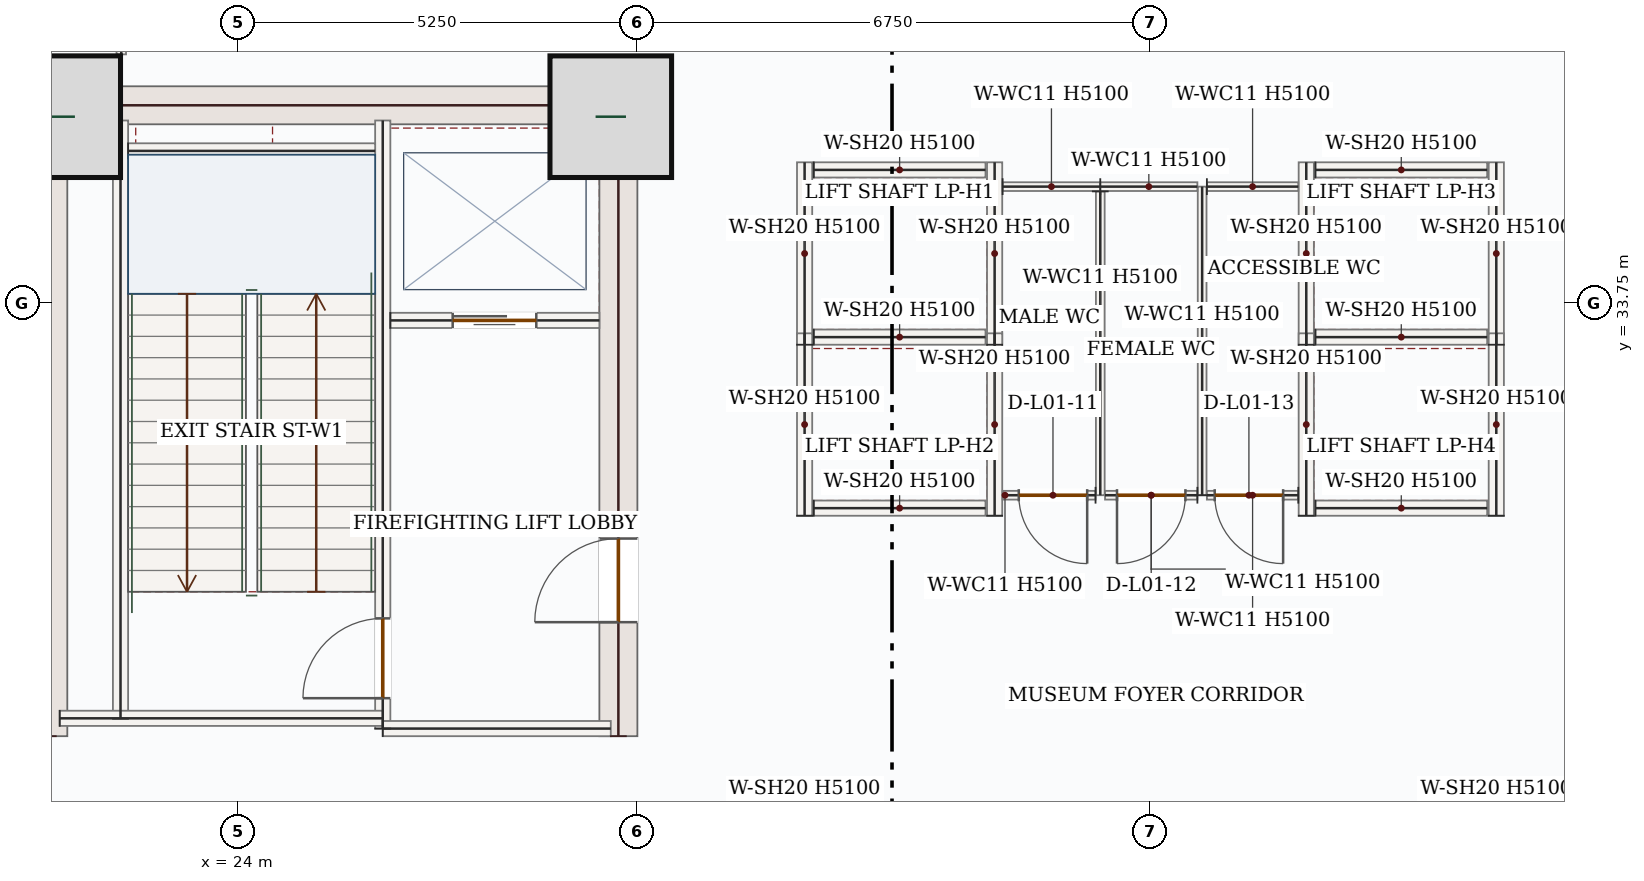
"""IFC4 building model, lengths in metres.
Left out: names, types, materials, properties, quantities, classifications, styles, units other than length and angle.
Written with IfcOpenShell. Run it as: python <this file> out.ifc"""

import sys

from ifc_helpers import new_model, si_unit, direction, frame, frame_2d, origin, origin_2d, place, context, subcontext, project, spatial, rectangle, extrude, source, transform, mapped, element, fill, save


model = new_model("IFC4")
c1 = context("Model", 3, precision=1e-05, world=origin(), true_north=direction((0.0, 1.0)))
c2 = subcontext(c1, "Body", "Model", "MODEL_VIEW")
j1 = project(units=[si_unit("LENGTHUNIT", "METRE"), si_unit("PLANEANGLEUNIT", "RADIAN")], contexts=[c1])
p1 = place(None, origin())
s1 = spatial("IfcSite", under=j1, at=p1, CompositionType="ELEMENT")
p2 = place(p1, origin())
s2 = spatial("IfcBuilding", under=s1, at=p2, CompositionType="ELEMENT")
p3 = place(p2, frame((0.0, 0.0, 7.2)))
s3 = spatial("IfcBuildingStorey", under=s2, at=p3, CompositionType="ELEMENT", Elevation=7.2)
m1 = source(origin(), c2, "Body", "SweptSolid", [
    extrude(rectangle(XDim=8.55, YDim=0.5, at=frame_2d((4.275, 0.0))), origin(), (0.0, 0.0, 1.0), 5.1),
])
p4 = place(p3, frame((21.5, 28.05, 0.0), z_axis=(0.0, 0.0, 1.0), x_axis=(0.0, 1.0, 0.0)))
e1 = element("IfcWall", 1, at=p4, inside=s3, PredefinedType="SHEAR", context=c2, shape_type="MappedRepresentation", body=[
    mapped(m1, transform((0.0, 0.0, 0.0), x_axis=(1.0, 0.0, 0.0), y_axis=(0.0, 1.0, 0.0), z_axis=(0.0, 0.0, 1.0), scale=1.0)),
])
p5 = place(p3, frame((29.0, 28.05, 0.0), z_axis=(0.0, 0.0, 1.0), x_axis=(0.0, 1.0, 0.0)))
e2 = element("IfcWall", 2, at=p5, inside=s3, PredefinedType="SHEAR", context=c2, shape_type="SweptSolid", body=[
    extrude(rectangle(XDim=8.55, YDim=0.5, at=frame_2d((4.275, 0.0))), origin(), (0.0, 0.0, 1.0), 5.1),
])
p6 = place(p5, frame((1.5, 0.0, 0.0)))
e3 = element("IfcOpeningElement", 3, at=p6, cuts=e2, PredefinedType="OPENING", context=c2, shape_type="SweptSolid", body=[
    extrude(rectangle(XDim=1.1, YDim=2.2, at=frame_2d((0.55, 1.1))), frame((0.0, 0.26, 0.0), z_axis=(0.0, -1.0, 0.0), x_axis=(1.0, 0.0, 0.0)), (0.0, 0.0, 1.0), 0.52),
])
m2 = source(origin(), c2, "Body", "SweptSolid", [
    extrude(rectangle(XDim=7.0, YDim=0.5, at=frame_2d((3.5, 0.0))), origin(), (0.0, 0.0, 1.0), 5.1),
])
p7 = place(p3, frame((21.75, 36.35, 0.0), z_axis=(0.0, 0.0, 1.0), x_axis=(1.0, 0.0, 0.0)))
e4 = element("IfcWall", 4, at=p7, inside=s3, PredefinedType="SHEAR", context=c2, shape_type="MappedRepresentation", body=[
    mapped(m2, transform((0.0, 0.0, 0.0), x_axis=(1.0, 0.0, 0.0), y_axis=(0.0, 1.0, 0.0), z_axis=(0.0, 0.0, 1.0), scale=1.0)),
])
m3 = source(origin(), c2, "Body", "SweptSolid", [
    extrude(rectangle(XDim=1.6, YDim=1.6, at=origin_2d()), origin(), (0.0, 0.0, 1.0), 5.4),
])
for number, where, z_axis, x_axis in (
    (5, (21.65, 36.2, 0.0), (0.0, 0.0, 1.0), (1.0, 0.0, 0.0)),
    (6, (28.9, 36.2, 0.0), (0.0, 0.0, 1.0), (1.0, 0.0, 0.0)),
):
    element("IfcColumn", number, at=place(p3, frame(where, z_axis=z_axis, x_axis=x_axis)), inside=s3, PredefinedType="COLUMN", context=c2, shape_type="MappedRepresentation", body=[
        mapped(m3, transform((0.0, 0.0, 0.0), x_axis=(1.0, 0.0, 0.0), y_axis=(0.0, 1.0, 0.0), z_axis=(0.0, 0.0, 1.0), scale=1.0)),
    ])
m4 = source(origin(), c2, "Body", "SweptSolid", [
    extrude(rectangle(XDim=7.87, YDim=0.2, at=frame_2d((3.935, 0.0))), origin(), (0.0, 0.0, 1.0), 5.1),
])
p8 = place(p3, frame((22.45, 28.28, 0.0), z_axis=(0.0, 0.0, 1.0), x_axis=(0.0, 1.0, 0.0)))
e7 = element("IfcWall", 7, at=p8, inside=s3, PredefinedType="SOLIDWALL", context=c2, shape_type="MappedRepresentation", body=[
    mapped(m4, transform((0.0, 0.0, 0.0), x_axis=(1.0, 0.0, 0.0), y_axis=(0.0, 1.0, 0.0), z_axis=(0.0, 0.0, 1.0), scale=1.0)),
])
p9 = place(p3, frame((25.9, 28.15, 0.0), z_axis=(0.0, 0.0, 1.0), x_axis=(0.0, 1.0, 0.0)))
e8 = element("IfcWall", 8, at=p9, inside=s3, PredefinedType="SOLIDWALL", context=c2, shape_type="SweptSolid", body=[
    extrude(rectangle(XDim=8.0, YDim=0.2, at=frame_2d((4.0, 0.0))), origin(), (0.0, 0.0, 1.0), 5.1),
])
p10 = place(p9, frame((0.4, 0.0, 0.0)))
e9 = element("IfcOpeningElement", 9, at=p10, cuts=e8, PredefinedType="OPENING", context=c2, shape_type="SweptSolid", body=[
    extrude(rectangle(XDim=1.05, YDim=2.15, at=frame_2d((0.525, 1.075))), frame((0.0, 0.11, 0.0), z_axis=(0.0, -1.0, 0.0), x_axis=(1.0, 0.0, 0.0)), (0.0, 0.0, 1.0), 0.22),
])
m5 = source(origin(), c2, "Body", "SweptSolid", [
    extrude(rectangle(XDim=4.25, YDim=0.2, at=frame_2d((2.125, 0.0))), origin(), (0.0, 0.0, 1.0), 5.1),
])
p11 = place(p3, frame((21.65, 28.285, 0.0), z_axis=(0.0, 0.0, 1.0), x_axis=(1.0, 0.0, 0.0)))
e10 = element("IfcWall", 10, at=p11, inside=s3, PredefinedType="SOLIDWALL", context=c2, shape_type="MappedRepresentation", body=[
    mapped(m5, transform((0.0, 0.0, 0.0), x_axis=(1.0, 0.0, 0.0), y_axis=(0.0, 1.0, 0.0), z_axis=(0.0, 0.0, 1.0), scale=1.0)),
])
m6 = source(origin(), c2, "Body", "SweptSolid", [
    extrude(rectangle(XDim=3.0, YDim=0.2, at=frame_2d((1.5, 0.0))), origin(), (0.0, 0.0, 1.0), 5.1),
])
p12 = place(p3, frame((25.9, 28.15, 0.0), z_axis=(0.0, 0.0, 1.0), x_axis=(1.0, 0.0, 0.0)))
e11 = element("IfcWall", 11, at=p12, inside=s3, PredefinedType="SOLIDWALL", context=c2, shape_type="MappedRepresentation", body=[
    mapped(m6, transform((0.0, 0.0, 0.0), x_axis=(1.0, 0.0, 0.0), y_axis=(0.0, 1.0, 0.0), z_axis=(0.0, 0.0, 1.0), scale=1.0)),
])
m7 = source(origin(), c2, "Body", "SweptSolid", [
    extrude(rectangle(XDim=3.25, YDim=0.2, at=frame_2d((1.625, 0.0))), origin(), (0.0, 0.0, 1.0), 5.1),
])
p13 = place(p3, frame((22.55, 35.75, 0.0), z_axis=(0.0, 0.0, 1.0), x_axis=(1.0, 0.0, 0.0)))
e12 = element("IfcWall", 12, at=p13, inside=s3, PredefinedType="SOLIDWALL", context=c2, shape_type="MappedRepresentation", body=[
    mapped(m7, transform((0.0, 0.0, 0.0), x_axis=(1.0, 0.0, 0.0), y_axis=(0.0, 1.0, 0.0), z_axis=(0.0, 0.0, 1.0), scale=1.0)),
])
p14 = place(p3, frame((26.0, 33.52, 0.0), z_axis=(0.0, 0.0, 1.0), x_axis=(1.0, 0.0, 0.0)))
e13 = element("IfcWall", 13, at=p14, inside=s3, PredefinedType="SOLIDWALL", context=c2, shape_type="SweptSolid", body=[
    extrude(rectangle(XDim=2.75, YDim=0.2, at=frame_2d((1.375, 0.0))), origin(), (0.0, 0.0, 1.0), 5.1),
])
p15 = place(p14, frame((0.82, 0.0, 0.0)))
e14 = element("IfcOpeningElement", 14, at=p15, cuts=e13, PredefinedType="OPENING", context=c2, shape_type="SweptSolid", body=[
    extrude(rectangle(XDim=1.1, YDim=2.15, at=frame_2d((0.55, 1.075))), frame((0.0, 0.11, 0.0), z_axis=(0.0, -1.0, 0.0), x_axis=(1.0, 0.0, 0.0)), (0.0, 0.0, 1.0), 0.22),
])
m8 = source(origin(), c2, "Body", "SweptSolid", [
    extrude(rectangle(XDim=2.4, YDim=0.2, at=frame_2d((1.2, 0.0))), origin(), (0.0, 0.0, 1.0), 5.1),
])
for number, where, z_axis, x_axis in (
    (15, (31.45, 33.2, 0.0), (0.0, 0.0, 1.0), (0.0, 1.0, 0.0)),
    (16, (33.95, 33.2, 0.0), (0.0, 0.0, 1.0), (0.0, 1.0, 0.0)),
):
    element("IfcWall", number, at=place(p3, frame(where, z_axis=z_axis, x_axis=x_axis)), inside=s3, PredefinedType="SOLIDWALL", context=c2, shape_type="MappedRepresentation", body=[
        mapped(m8, transform((0.0, 0.0, 0.0), x_axis=(1.0, 0.0, 0.0), y_axis=(0.0, 1.0, 0.0), z_axis=(0.0, 0.0, 1.0), scale=1.0)),
    ])
m9 = source(origin(), c2, "Body", "SweptSolid", [
    extrude(rectangle(XDim=2.26, YDim=0.2, at=frame_2d((1.13, 0.0))), origin(), (0.0, 0.0, 1.0), 5.1),
])
for number, where, z_axis, x_axis in (
    (17, (31.57, 33.3, 0.0), (0.0, 0.0, 1.0), (1.0, 0.0, 0.0)),
    (18, (31.57, 35.5, 0.0), (0.0, 0.0, 1.0), (1.0, 0.0, 0.0)),
):
    element("IfcWall", number, at=place(p3, frame(where, z_axis=z_axis, x_axis=x_axis)), inside=s3, PredefinedType="SOLIDWALL", context=c2, shape_type="MappedRepresentation", body=[
        mapped(m9, transform((0.0, 0.0, 0.0), x_axis=(1.0, 0.0, 0.0), y_axis=(0.0, 1.0, 0.0), z_axis=(0.0, 0.0, 1.0), scale=1.0)),
    ])
for number, where, z_axis, x_axis in (
    (19, (31.45, 30.95, 0.0), (0.0, 0.0, 1.0), (0.0, 1.0, 0.0)),
    (20, (33.95, 30.95, 0.0), (0.0, 0.0, 1.0), (0.0, 1.0, 0.0)),
):
    element("IfcWall", number, at=place(p3, frame(where, z_axis=z_axis, x_axis=x_axis)), inside=s3, PredefinedType="SOLIDWALL", context=c2, shape_type="MappedRepresentation", body=[
        mapped(m8, transform((0.0, 0.0, 0.0), x_axis=(1.0, 0.0, 0.0), y_axis=(0.0, 1.0, 0.0), z_axis=(0.0, 0.0, 1.0), scale=1.0)),
    ])
p16 = place(p3, frame((31.57, 31.05, 0.0), z_axis=(0.0, 0.0, 1.0), x_axis=(1.0, 0.0, 0.0)))
e21 = element("IfcWall", 21, at=p16, inside=s3, PredefinedType="SOLIDWALL", context=c2, shape_type="MappedRepresentation", body=[
    mapped(m9, transform((0.0, 0.0, 0.0), x_axis=(1.0, 0.0, 0.0), y_axis=(0.0, 1.0, 0.0), z_axis=(0.0, 0.0, 1.0), scale=1.0)),
])
for number, where, z_axis, x_axis in (
    (22, (38.05, 33.2, 0.0), (0.0, 0.0, 1.0), (0.0, 1.0, 0.0)),
    (23, (40.55, 33.2, 0.0), (0.0, 0.0, 1.0), (0.0, 1.0, 0.0)),
):
    element("IfcWall", number, at=place(p3, frame(where, z_axis=z_axis, x_axis=x_axis)), inside=s3, PredefinedType="SOLIDWALL", context=c2, shape_type="MappedRepresentation", body=[
        mapped(m8, transform((0.0, 0.0, 0.0), x_axis=(1.0, 0.0, 0.0), y_axis=(0.0, 1.0, 0.0), z_axis=(0.0, 0.0, 1.0), scale=1.0)),
    ])
for number, where, z_axis, x_axis in (
    (24, (38.17, 33.3, 0.0), (0.0, 0.0, 1.0), (1.0, 0.0, 0.0)),
    (25, (38.17, 35.5, 0.0), (0.0, 0.0, 1.0), (1.0, 0.0, 0.0)),
):
    element("IfcWall", number, at=place(p3, frame(where, z_axis=z_axis, x_axis=x_axis)), inside=s3, PredefinedType="SOLIDWALL", context=c2, shape_type="MappedRepresentation", body=[
        mapped(m9, transform((0.0, 0.0, 0.0), x_axis=(1.0, 0.0, 0.0), y_axis=(0.0, 1.0, 0.0), z_axis=(0.0, 0.0, 1.0), scale=1.0)),
    ])
for number, where, z_axis, x_axis in (
    (26, (38.05, 30.95, 0.0), (0.0, 0.0, 1.0), (0.0, 1.0, 0.0)),
    (27, (40.55, 30.95, 0.0), (0.0, 0.0, 1.0), (0.0, 1.0, 0.0)),
):
    element("IfcWall", number, at=place(p3, frame(where, z_axis=z_axis, x_axis=x_axis)), inside=s3, PredefinedType="SOLIDWALL", context=c2, shape_type="MappedRepresentation", body=[
        mapped(m8, transform((0.0, 0.0, 0.0), x_axis=(1.0, 0.0, 0.0), y_axis=(0.0, 1.0, 0.0), z_axis=(0.0, 0.0, 1.0), scale=1.0)),
    ])
p17 = place(p3, frame((38.17, 31.05, 0.0), z_axis=(0.0, 0.0, 1.0), x_axis=(1.0, 0.0, 0.0)))
e28 = element("IfcWall", 28, at=p17, inside=s3, PredefinedType="SOLIDWALL", context=c2, shape_type="MappedRepresentation", body=[
    mapped(m9, transform((0.0, 0.0, 0.0), x_axis=(1.0, 0.0, 0.0), y_axis=(0.0, 1.0, 0.0), z_axis=(0.0, 0.0, 1.0), scale=1.0)),
])
m10 = source(origin(), c2, "Body", "SweptSolid", [
    extrude(rectangle(XDim=4.06, YDim=0.115, at=frame_2d((2.03, 0.0))), origin(), (0.0, 0.0, 1.0), 5.1),
])
p18 = place(p3, frame((36.68, 31.22, 0.0), z_axis=(0.0, 0.0, 1.0), x_axis=(0.0, 1.0, 0.0)))
e29 = element("IfcWall", 29, at=p18, inside=s3, PredefinedType="PARTITIONING", context=c2, shape_type="MappedRepresentation", body=[
    mapped(m10, transform((0.0, 0.0, 0.0), x_axis=(1.0, 0.0, 0.0), y_axis=(0.0, 1.0, 0.0), z_axis=(0.0, 0.0, 1.0), scale=1.0)),
])
m11 = source(origin(), c2, "Body", "SweptSolid", [
    extrude(rectangle(XDim=1.203, YDim=0.115, at=frame_2d((0.601, 0.0))), origin(), (0.0, 0.0, 1.0), 5.1),
])
p19 = place(p3, frame((36.742, 35.28, 0.0), z_axis=(0.0, 0.0, 1.0), x_axis=(1.0, 0.0, 0.0)))
e30 = element("IfcWall", 30, at=p19, inside=s3, PredefinedType="PARTITIONING", context=c2, shape_type="MappedRepresentation", body=[
    mapped(m11, transform((0.0, 0.0, 0.0), x_axis=(1.0, 0.0, 0.0), y_axis=(0.0, 1.0, 0.0), z_axis=(0.0, 0.0, 1.0), scale=1.0)),
])
p20 = place(p3, frame((37.945, 31.22, 0.0), z_axis=(0.0, 0.0, 1.0), x_axis=(-1.0, 0.0, 0.0)))
e31 = element("IfcWall", 31, at=p20, inside=s3, PredefinedType="PARTITIONING", context=c2, shape_type="SweptSolid", body=[
    extrude(rectangle(XDim=1.203, YDim=0.115, at=frame_2d((0.601, 0.0))), origin(), (0.0, 0.0, 1.0), 5.1),
])
p21 = place(p20, frame((0.2, 0.0, 0.0)))
e32 = element("IfcOpeningElement", 32, at=p21, cuts=e31, PredefinedType="OPENING", context=c2, shape_type="SweptSolid", body=[
    extrude(rectangle(XDim=0.9, YDim=2.1, at=frame_2d((0.45, 1.05))), frame((0.0, 0.067, 0.0), z_axis=(0.0, -1.0, 0.0), x_axis=(1.0, 0.0, 0.0)), (0.0, 0.0, 1.0), 0.135),
])
m12 = source(origin(), c2, "Body", "SweptSolid", [
    extrude(rectangle(XDim=1.285, YDim=0.115, at=frame_2d((0.643, 0.0))), origin(), (0.0, 0.0, 1.0), 5.1),
])
p22 = place(p3, frame((34.055, 35.28, 0.0), z_axis=(0.0, 0.0, 1.0), x_axis=(1.0, 0.0, 0.0)))
e33 = element("IfcWall", 33, at=p22, inside=s3, PredefinedType="PARTITIONING", context=c2, shape_type="MappedRepresentation", body=[
    mapped(m12, transform((0.0, 0.0, 0.0), x_axis=(1.0, 0.0, 0.0), y_axis=(0.0, 1.0, 0.0), z_axis=(0.0, 0.0, 1.0), scale=1.0)),
])
m13 = source(origin(), c2, "Body", "SweptSolid", [
    extrude(rectangle(XDim=3.998, YDim=0.115, at=frame_2d((1.999, 0.0))), origin(), (0.0, 0.0, 1.0), 5.1),
])
p23 = place(p3, frame((35.34, 35.218, 0.0), z_axis=(0.0, 0.0, 1.0), x_axis=(0.0, -1.0, 0.0)))
e34 = element("IfcWall", 34, at=p23, inside=s3, PredefinedType="PARTITIONING", context=c2, shape_type="MappedRepresentation", body=[
    mapped(m13, transform((0.0, 0.0, 0.0), x_axis=(1.0, 0.0, 0.0), y_axis=(0.0, 1.0, 0.0), z_axis=(0.0, 0.0, 1.0), scale=1.0)),
])
p24 = place(p3, frame((35.278, 31.22, 0.0), z_axis=(0.0, 0.0, 1.0), x_axis=(-1.0, 0.0, 0.0)))
e35 = element("IfcWall", 35, at=p24, inside=s3, PredefinedType="PARTITIONING", context=c2, shape_type="SweptSolid", body=[
    extrude(rectangle(XDim=1.223, YDim=0.115, at=frame_2d((0.611, 0.0))), origin(), (0.0, 0.0, 1.0), 5.1),
])
p25 = place(p24, frame((0.11, 0.0, 0.0)))
e36 = element("IfcOpeningElement", 36, at=p25, cuts=e35, PredefinedType="OPENING", context=c2, shape_type="SweptSolid", body=[
    extrude(rectangle(XDim=0.9, YDim=2.1, at=frame_2d((0.45, 1.05))), frame((0.0, 0.067, 0.0), z_axis=(0.0, -1.0, 0.0), x_axis=(1.0, 0.0, 0.0)), (0.0, 0.0, 1.0), 0.135),
])
m14 = source(origin(), c2, "Body", "SweptSolid", [
    extrude(rectangle(XDim=1.277, YDim=0.115, at=frame_2d((0.639, 0.0))), origin(), (0.0, 0.0, 1.0), 5.1),
])
p26 = place(p3, frame((35.34, 35.28, 0.0), z_axis=(0.0, 0.0, 1.0), x_axis=(1.0, 0.0, 0.0)))
e37 = element("IfcWall", 37, at=p26, inside=s3, PredefinedType="PARTITIONING", context=c2, shape_type="MappedRepresentation", body=[
    mapped(m14, transform((0.0, 0.0, 0.0), x_axis=(1.0, 0.0, 0.0), y_axis=(0.0, 1.0, 0.0), z_axis=(0.0, 0.0, 1.0), scale=1.0)),
])
p27 = place(p3, frame((36.617, 31.22, 0.0), z_axis=(0.0, 0.0, 1.0), x_axis=(-1.0, 0.0, 0.0)))
e38 = element("IfcWall", 38, at=p27, inside=s3, PredefinedType="PARTITIONING", context=c2, shape_type="SweptSolid", body=[
    extrude(rectangle(XDim=1.215, YDim=0.115, at=frame_2d((0.607, 0.0))), origin(), (0.0, 0.0, 1.0), 5.1),
])
p28 = place(p27, frame((0.157, 0.0, 0.0)))
e39 = element("IfcOpeningElement", 39, at=p28, cuts=e38, PredefinedType="OPENING", context=c2, shape_type="SweptSolid", body=[
    extrude(rectangle(XDim=0.9, YDim=2.1, at=frame_2d((0.45, 1.05))), frame((0.0, 0.067, 0.0), z_axis=(0.0, -1.0, 0.0), x_axis=(1.0, 0.0, 0.0)), (0.0, 0.0, 1.0), 0.135),
])
m15 = source(origin(), c2, "Body", "SweptSolid", [
    extrude(rectangle(XDim=1.826, YDim=0.125, at=frame_2d((0.913, 0.0))), origin(), (0.0, 0.0, 1.0), 5.1),
])
p29 = place(p3, frame((22.46, 38.846, 0.0), z_axis=(0.0, 0.0, 1.0), x_axis=(0.0, -1.0, 0.0)))
e40 = element("IfcWall", 40, at=p29, inside=s3, PredefinedType="PARTITIONING", context=c2, shape_type="MappedRepresentation", body=[
    mapped(m15, transform((0.0, 0.0, 0.0), x_axis=(1.0, 0.0, 0.0), y_axis=(0.0, 1.0, 0.0), z_axis=(0.0, 0.0, 1.0), scale=1.0)),
])
m16 = source(origin(), c2, "Body", "SweptSolid", [
    extrude(rectangle(XDim=1.05, YDim=2.15, at=frame_2d((0.525, 1.075))), frame((0.0, 0.025, 0.0), z_axis=(0.0, -1.0, 0.0), x_axis=(1.0, 0.0, 0.0)), (0.0, 0.0, 1.0), 0.05),
])
p30 = place(p10, origin())
e41 = element("IfcDoor", 41, at=p30, inside=s3, OperationType="SINGLE_SWING_LEFT", PredefinedType="DOOR", context=c2, shape_type="MappedRepresentation", body=[
    mapped(m16, transform((0.0, 0.0, 0.0), x_axis=(1.0, 0.0, 0.0), y_axis=(0.0, 1.0, 0.0), z_axis=(0.0, 0.0, 1.0), scale=1.0)),
])
fill(e9, e41)
m17 = source(origin(), c2, "Body", "SweptSolid", [
    extrude(rectangle(XDim=1.1, YDim=2.15, at=frame_2d((0.55, 1.075))), frame((0.0, 0.025, 0.0), z_axis=(0.0, -1.0, 0.0), x_axis=(1.0, 0.0, 0.0)), (0.0, 0.0, 1.0), 0.05),
])
p31 = place(p15, origin())
e42 = element("IfcDoor", 42, at=p31, inside=s3, OperationType="DOUBLE_DOOR_SLIDING", PredefinedType="DOOR", context=c2, shape_type="MappedRepresentation", body=[
    mapped(m17, transform((0.0, 0.0, 0.0), x_axis=(1.0, 0.0, 0.0), y_axis=(0.0, 1.0, 0.0), z_axis=(0.0, 0.0, 1.0), scale=1.0)),
])
fill(e14, e42)
m18 = source(origin(), c2, "Body", "SweptSolid", [
    extrude(rectangle(XDim=1.1, YDim=2.2, at=frame_2d((0.55, 1.1))), frame((0.0, 0.025, 0.0), z_axis=(0.0, -1.0, 0.0), x_axis=(1.0, 0.0, 0.0)), (0.0, 0.0, 1.0), 0.05),
])
p32 = place(p6, origin())
e43 = element("IfcDoor", 43, at=p32, inside=s3, OperationType="SINGLE_SWING_LEFT", PredefinedType="DOOR", context=c2, shape_type="MappedRepresentation", body=[
    mapped(m18, transform((0.0, 0.0, 0.0), x_axis=(1.0, 0.0, 0.0), y_axis=(0.0, 1.0, 0.0), z_axis=(0.0, 0.0, 1.0), scale=1.0)),
])
fill(e3, e43)
m19 = source(origin(), c2, "Body", "SweptSolid", [
    extrude(rectangle(XDim=0.9, YDim=2.1, at=frame_2d((0.45, 1.05))), frame((0.0, 0.025, 0.0), z_axis=(0.0, -1.0, 0.0), x_axis=(1.0, 0.0, 0.0)), (0.0, 0.0, 1.0), 0.05),
])
p33 = place(p25, origin())
e44 = element("IfcDoor", 44, at=p33, inside=s3, OperationType="SINGLE_SWING_LEFT", PredefinedType="DOOR", context=c2, shape_type="MappedRepresentation", body=[
    mapped(m19, transform((0.0, 0.0, 0.0), x_axis=(1.0, 0.0, 0.0), y_axis=(0.0, 1.0, 0.0), z_axis=(0.0, 0.0, 1.0), scale=1.0)),
])
fill(e36, e44)
p34 = place(p28, origin())
e45 = element("IfcDoor", 45, at=p34, inside=s3, OperationType="SINGLE_SWING_RIGHT", PredefinedType="DOOR", context=c2, shape_type="MappedRepresentation", body=[
    mapped(m19, transform((0.0, 0.0, 0.0), x_axis=(1.0, 0.0, 0.0), y_axis=(0.0, 1.0, 0.0), z_axis=(0.0, 0.0, 1.0), scale=1.0)),
])
fill(e39, e45)
p35 = place(p21, origin())
e46 = element("IfcDoor", 46, at=p35, inside=s3, OperationType="SINGLE_SWING_LEFT", PredefinedType="DOOR", context=c2, shape_type="MappedRepresentation", body=[
    mapped(m19, transform((0.0, 0.0, 0.0), x_axis=(1.0, 0.0, 0.0), y_axis=(0.0, 1.0, 0.0), z_axis=(0.0, 0.0, 1.0), scale=1.0)),
])
fill(e32, e46)
save(model, sys.argv[1])
